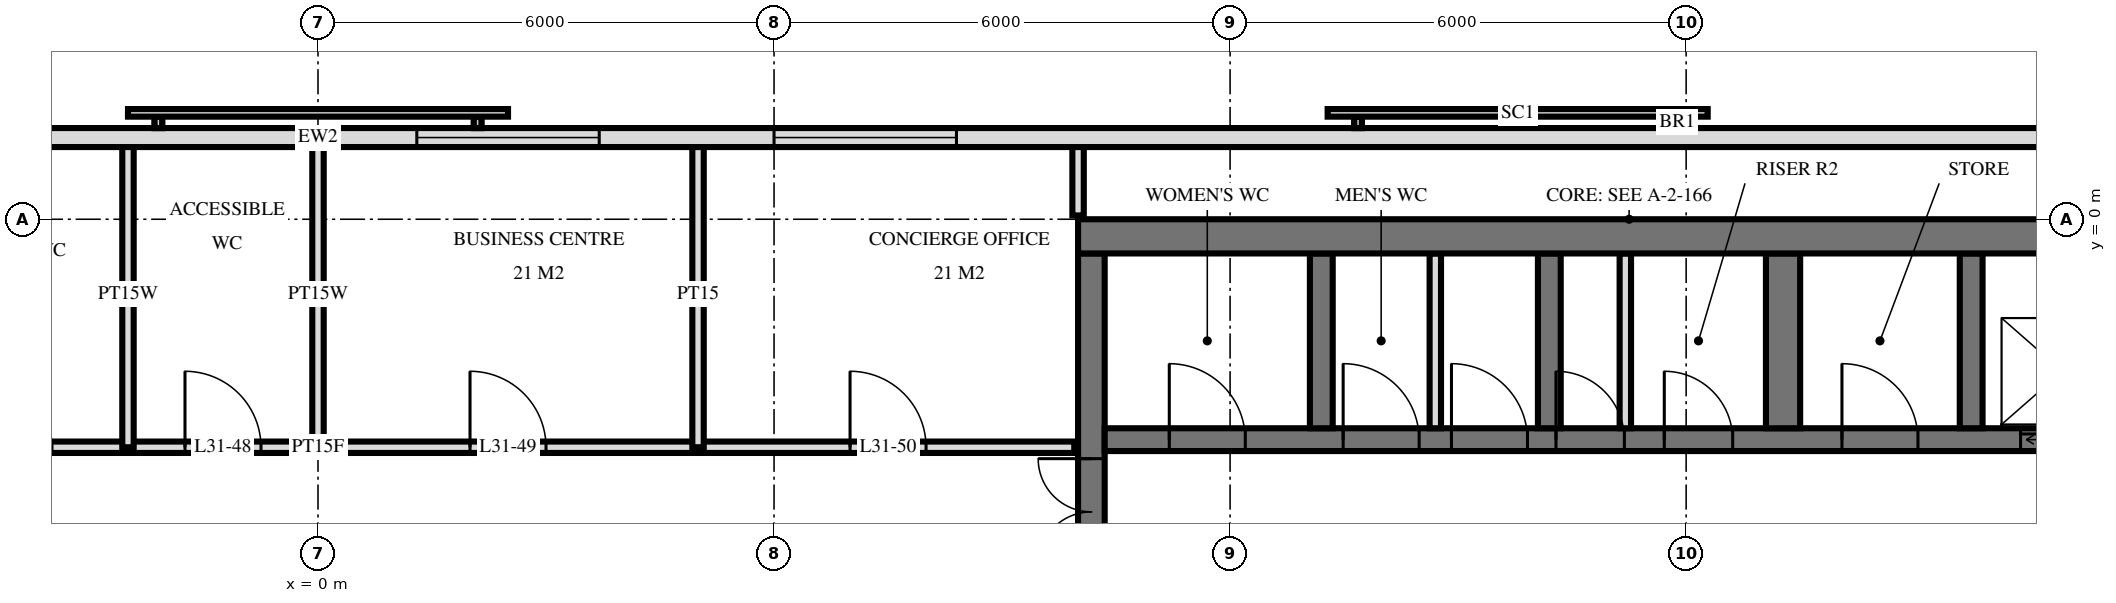
"""IFC4 building model, lengths in metres.
Left out: names, types, materials, properties, quantities, classifications, styles, units other than length and angle.
Written with IfcOpenShell. Run it as: python <this file> out.ifc"""

import sys

from ifc_helpers import new_model, si_unit, direction, frame, frame_2d, origin, place, context, subcontext, project, spatial, rectangle, extrude, element, fill, save


model = new_model("IFC4")
c1 = context("Model", 3, precision=1e-05, world=origin(), true_north=direction((0.0, 1.0)))
c2 = subcontext(c1, "Body", "Model", "MODEL_VIEW")
j1 = project(units=[si_unit("LENGTHUNIT", "METRE"), si_unit("PLANEANGLEUNIT", "RADIAN")], contexts=[c1])
p1 = place(None, origin())
s1 = spatial("IfcSite", under=j1, at=p1, CompositionType="ELEMENT")
p2 = place(p1, origin())
s2 = spatial("IfcBuilding", under=s1, at=p2, CompositionType="ELEMENT")
p3 = place(p2, frame((0.0, 0.0, 123.6)))
s3 = spatial("IfcBuildingStorey", under=s2, at=p3, CompositionType="ELEMENT", Elevation=123.6)
p4 = place(p3, frame((10.0, -0.225, 0.0), z_axis=(0.0, 0.0, 1.0), x_axis=(1.0, 0.0, 0.0)))
e1 = element("IfcWall", 1, at=p4, inside=s3, PredefinedType="SHEAR", context=c2, shape_type="SweptSolid", body=[
    extrude(rectangle(XDim=14.5, YDim=0.45, at=frame_2d((7.25, 0.0))), origin(), (0.0, 0.0, 1.0), 3.6),
])
p5 = place(p3, frame((10.175, -14.55, 0.0), z_axis=(0.0, 0.0, 1.0), x_axis=(0.0, 1.0, 0.0)))
e2 = element("IfcWall", 2, at=p5, inside=s3, PredefinedType="SHEAR", context=c2, shape_type="SweptSolid", body=[
    extrude(rectangle(XDim=14.1, YDim=0.35, at=frame_2d((7.05, 0.0))), origin(), (0.0, 0.0, 1.0), 3.6),
])
p6 = place(p5, frame((8.4, 0.0, 0.0)))
e3 = element("IfcOpeningElement", 3, at=p6, cuts=e2, PredefinedType="OPENING", context=c2, shape_type="SweptSolid", body=[
    extrude(rectangle(XDim=1.4, YDim=2.4, at=frame_2d((0.7, 1.2))), frame((0.0, 0.185, 0.0), z_axis=(0.0, -1.0, 0.0), x_axis=(1.0, 0.0, 0.0)), (0.0, 0.0, 1.0), 0.37),
])
p7 = place(p5, frame((10.0, 0.0, 0.0)))
e4 = element("IfcOpeningElement", 4, at=p7, cuts=e2, PredefinedType="OPENING", context=c2, shape_type="SweptSolid", body=[
    extrude(rectangle(XDim=1.4, YDim=2.4, at=frame_2d((0.7, 1.2))), frame((0.0, 0.185, 0.0), z_axis=(0.0, -1.0, 0.0), x_axis=(1.0, 0.0, 0.0)), (0.0, 0.0, 1.0), 0.37),
])
p8 = place(p5, frame((4.0, 0.0, 0.0)))
e5 = element("IfcOpeningElement", 5, at=p8, cuts=e2, PredefinedType="OPENING", context=c2, shape_type="SweptSolid", body=[
    extrude(rectangle(XDim=1.2, YDim=2.1, at=frame_2d((0.6, 1.05))), frame((0.0, 0.185, 0.0), z_axis=(0.0, -1.0, 0.0), x_axis=(1.0, 0.0, 0.0)), (0.0, 0.0, 1.0), 0.37),
])
p9 = place(p3, frame((10.35, -2.9, 0.0), z_axis=(0.0, 0.0, 1.0), x_axis=(1.0, 0.0, 0.0)))
e6 = element("IfcWall", 6, at=p9, inside=s3, PredefinedType="SHEAR", context=c2, shape_type="SweptSolid", body=[
    extrude(rectangle(XDim=13.7, YDim=0.3, at=frame_2d((6.85, 0.0))), origin(), (0.0, 0.0, 1.0), 3.6),
])
p10 = place(p9, frame((12.05, 0.0, 0.0)))
e7 = element("IfcOpeningElement", 7, at=p10, cuts=e6, PredefinedType="OPENING", context=c2, shape_type="SweptSolid", body=[
    extrude(rectangle(XDim=1.1, YDim=2.1, at=frame_2d((0.55, 1.05))), frame((0.0, 0.16, 0.0), z_axis=(0.0, -1.0, 0.0), x_axis=(1.0, 0.0, 0.0)), (0.0, 0.0, 1.0), 0.32),
])
p11 = place(p9, frame((5.938, 0.0, 0.0)))
e8 = element("IfcOpeningElement", 8, at=p11, cuts=e6, PredefinedType="OPENING", context=c2, shape_type="SweptSolid", body=[
    extrude(rectangle(XDim=0.9, YDim=2.1, at=frame_2d((0.45, 1.05))), frame((0.0, 0.16, 0.0), z_axis=(0.0, -1.0, 0.0), x_axis=(1.0, 0.0, 0.0)), (0.0, 0.0, 1.0), 0.32),
])
p12 = place(p9, frame((7.363, 0.0, 0.0)))
e9 = element("IfcOpeningElement", 9, at=p12, cuts=e6, PredefinedType="OPENING", context=c2, shape_type="SweptSolid", body=[
    extrude(rectangle(XDim=0.9, YDim=2.1, at=frame_2d((0.45, 1.05))), frame((0.0, 0.16, 0.0), z_axis=(0.0, -1.0, 0.0), x_axis=(1.0, 0.0, 0.0)), (0.0, 0.0, 1.0), 0.32),
])
p13 = place(p9, frame((0.85, 0.0, 0.0)))
e10 = element("IfcOpeningElement", 10, at=p13, cuts=e6, PredefinedType="OPENING", context=c2, shape_type="SweptSolid", body=[
    extrude(rectangle(XDim=1.0, YDim=2.1, at=frame_2d((0.5, 1.05))), frame((0.0, 0.16, 0.0), z_axis=(0.0, -1.0, 0.0), x_axis=(1.0, 0.0, 0.0)), (0.0, 0.0, 1.0), 0.32),
])
p14 = place(p9, frame((3.137, 0.0, 0.0)))
e11 = element("IfcOpeningElement", 11, at=p14, cuts=e6, PredefinedType="OPENING", context=c2, shape_type="SweptSolid", body=[
    extrude(rectangle(XDim=1.0, YDim=2.1, at=frame_2d((0.5, 1.05))), frame((0.0, 0.16, 0.0), z_axis=(0.0, -1.0, 0.0), x_axis=(1.0, 0.0, 0.0)), (0.0, 0.0, 1.0), 0.32),
])
p15 = place(p9, frame((4.562, 0.0, 0.0)))
e12 = element("IfcOpeningElement", 12, at=p15, cuts=e6, PredefinedType="OPENING", context=c2, shape_type="SweptSolid", body=[
    extrude(rectangle(XDim=1.0, YDim=2.1, at=frame_2d((0.5, 1.05))), frame((0.0, 0.16, 0.0), z_axis=(0.0, -1.0, 0.0), x_axis=(1.0, 0.0, 0.0)), (0.0, 0.0, 1.0), 0.32),
])
p16 = place(p9, frame((9.7, 0.0, 0.0)))
e13 = element("IfcOpeningElement", 13, at=p16, cuts=e6, PredefinedType="OPENING", context=c2, shape_type="SweptSolid", body=[
    extrude(rectangle(XDim=1.0, YDim=2.1, at=frame_2d((0.5, 1.05))), frame((0.0, 0.16, 0.0), z_axis=(0.0, -1.0, 0.0), x_axis=(1.0, 0.0, 0.0)), (0.0, 0.0, 1.0), 0.32),
])
for number, where, z_axis, x_axis in (
    (14, (13.2, -2.75, 0.0), (0.0, 0.0, 1.0), (0.0, 1.0, 0.0)),
    (15, (16.2, -2.75, 0.0), (0.0, 0.0, 1.0), (0.0, 1.0, 0.0)),
):
    element("IfcWall", number, at=place(p3, frame(where, z_axis=z_axis, x_axis=x_axis)), inside=s3, PredefinedType="SHEAR", context=c2, shape_type="SweptSolid", body=[
        extrude(rectangle(XDim=2.3, YDim=0.3, at=frame_2d((1.15, 0.0))), origin(), (0.0, 0.0, 1.0), 3.6),
    ])
p17 = place(p3, frame((19.275, -2.75, 0.0), z_axis=(0.0, 0.0, 1.0), x_axis=(0.0, 1.0, 0.0)))
e16 = element("IfcWall", 16, at=p17, inside=s3, PredefinedType="SHEAR", context=c2, shape_type="SweptSolid", body=[
    extrude(rectangle(XDim=2.3, YDim=0.45, at=frame_2d((1.15, 0.0))), origin(), (0.0, 0.0, 1.0), 3.6),
])
p18 = place(p3, frame((21.75, -2.75, 0.0), z_axis=(0.0, 0.0, 1.0), x_axis=(0.0, 1.0, 0.0)))
e17 = element("IfcWall", 17, at=p18, inside=s3, PredefinedType="SHEAR", context=c2, shape_type="SweptSolid", body=[
    extrude(rectangle(XDim=2.3, YDim=0.3, at=frame_2d((1.15, 0.0))), origin(), (0.0, 0.0, 1.0), 3.6),
])
p19 = place(p3, frame((23.675, 1.075, 0.0), z_axis=(0.0, 0.0, 1.0), x_axis=(-1.0, 0.0, 0.0)))
e18 = element("IfcWall", 18, at=p19, inside=s3, PredefinedType="SOLIDWALL", context=c2, shape_type="SweptSolid", body=[
    extrude(rectangle(XDim=47.351, YDim=0.25, at=frame_2d((23.675, 0.0))), origin(), (0.0, 0.0, 1.0), 3.32),
])
p20 = place(p19, frame((15.275, 0.0, 0.3)))
e19 = element("IfcOpeningElement", 19, at=p20, cuts=e18, PredefinedType="OPENING", context=c2, shape_type="SweptSolid", body=[
    extrude(rectangle(XDim=2.4, YDim=2.1, at=frame_2d((1.2, 1.05))), frame((0.0, 0.135, 0.0), z_axis=(0.0, -1.0, 0.0), x_axis=(1.0, 0.0, 0.0)), (0.0, 0.0, 1.0), 0.27),
])
p21 = place(p19, frame((19.975, 0.0, 0.3)))
e20 = element("IfcOpeningElement", 20, at=p21, cuts=e18, PredefinedType="OPENING", context=c2, shape_type="SweptSolid", body=[
    extrude(rectangle(XDim=2.4, YDim=2.1, at=frame_2d((1.2, 1.05))), frame((0.0, 0.135, 0.0), z_axis=(0.0, -1.0, 0.0), x_axis=(1.0, 0.0, 0.0)), (0.0, 0.0, 1.0), 0.27),
])
for number, where, z_axis, x_axis in (
    (21, (17.2, -2.75, 0.0), (0.0, 0.0, 1.0), (0.0, 1.0, 0.0)),
    (22, (14.7, -2.75, 0.0), (0.0, 0.0, 1.0), (0.0, 1.0, 0.0)),
):
    element("IfcWall", number, at=place(p3, frame(where, z_axis=z_axis, x_axis=x_axis)), inside=s3, PredefinedType="PARTITIONING", context=c2, shape_type="SweptSolid", body=[
        extrude(rectangle(XDim=2.3, YDim=0.15, at=frame_2d((1.15, 0.0))), origin(), (0.0, 0.0, 1.0), 3.3),
    ])
p22 = place(p3, frame((10.0, 0.05, 0.0), z_axis=(0.0, 0.0, 1.0), x_axis=(0.0, 1.0, 0.0)))
e23 = element("IfcWall", 23, at=p22, inside=s3, PredefinedType="PARTITIONING", context=c2, shape_type="SweptSolid", body=[
    extrude(rectangle(XDim=0.97, YDim=0.15, at=frame_2d((0.485, 0.0))), origin(), (0.0, 0.0, 1.0), 3.32),
])
p23 = place(p3, frame((5.0, -3.0, 0.0), z_axis=(0.0, 0.0, 1.0), x_axis=(0.0, 1.0, 0.0)))
e24 = element("IfcWall", 24, at=p23, inside=s3, PredefinedType="PARTITIONING", context=c2, shape_type="SweptSolid", body=[
    extrude(rectangle(XDim=4.02, YDim=0.15, at=frame_2d((2.01, 0.0))), origin(), (0.0, 0.0, 1.0), 3.32),
])
for number, where, z_axis, x_axis in (
    (25, (0.0, -3.0, 0.0), (0.0, 0.0, 1.0), (0.0, 1.0, 0.0)),
    (26, (-2.5, -3.0, 0.0), (0.0, 0.0, 1.0), (0.0, 1.0, 0.0)),
):
    element("IfcWall", number, at=place(p3, frame(where, z_axis=z_axis, x_axis=x_axis)), inside=s3, PredefinedType="PLUMBINGWALL", context=c2, shape_type="SweptSolid", body=[
        extrude(rectangle(XDim=4.02, YDim=0.15, at=frame_2d((2.01, 0.0))), origin(), (0.0, 0.0, 1.0), 3.32),
    ])
p24 = place(p3, frame((-9.95, -3.0, 0.0), z_axis=(0.0, 0.0, 1.0), x_axis=(1.0, 0.0, 0.0)))
e27 = element("IfcWall", 27, at=p24, inside=s3, PredefinedType="PARTITIONING", context=c2, shape_type="SweptSolid", body=[
    extrude(rectangle(XDim=19.9, YDim=0.15, at=frame_2d((9.95, 0.0))), origin(), (0.0, 0.0, 1.0), 3.32),
])
p25 = place(p24, frame((1.7, 0.0, 0.0)))
e28 = element("IfcOpeningElement", 28, at=p25, cuts=e27, PredefinedType="OPENING", context=c2, shape_type="SweptSolid", body=[
    extrude(rectangle(XDim=1.0, YDim=2.1, at=frame_2d((0.5, 1.05))), frame((0.0, 0.085, 0.0), z_axis=(0.0, -1.0, 0.0), x_axis=(1.0, 0.0, 0.0)), (0.0, 0.0, 1.0), 0.17),
])
p26 = place(p24, frame((5.45, 0.0, 0.0)))
e29 = element("IfcOpeningElement", 29, at=p26, cuts=e27, PredefinedType="OPENING", context=c2, shape_type="SweptSolid", body=[
    extrude(rectangle(XDim=1.0, YDim=2.1, at=frame_2d((0.5, 1.05))), frame((0.0, 0.085, 0.0), z_axis=(0.0, -1.0, 0.0), x_axis=(1.0, 0.0, 0.0)), (0.0, 0.0, 1.0), 0.17),
])
p27 = place(p24, frame((8.2, 0.0, 0.0)))
e30 = element("IfcOpeningElement", 30, at=p27, cuts=e27, PredefinedType="OPENING", context=c2, shape_type="SweptSolid", body=[
    extrude(rectangle(XDim=1.0, YDim=2.1, at=frame_2d((0.5, 1.05))), frame((0.0, 0.085, 0.0), z_axis=(0.0, -1.0, 0.0), x_axis=(1.0, 0.0, 0.0)), (0.0, 0.0, 1.0), 0.17),
])
p28 = place(p24, frame((11.95, 0.0, 0.0)))
e31 = element("IfcOpeningElement", 31, at=p28, cuts=e27, PredefinedType="OPENING", context=c2, shape_type="SweptSolid", body=[
    extrude(rectangle(XDim=1.0, YDim=2.1, at=frame_2d((0.5, 1.05))), frame((0.0, 0.085, 0.0), z_axis=(0.0, -1.0, 0.0), x_axis=(1.0, 0.0, 0.0)), (0.0, 0.0, 1.0), 0.17),
])
p29 = place(p24, frame((16.95, 0.0, 0.0)))
e32 = element("IfcOpeningElement", 32, at=p29, cuts=e27, PredefinedType="OPENING", context=c2, shape_type="SweptSolid", body=[
    extrude(rectangle(XDim=1.0, YDim=2.1, at=frame_2d((0.5, 1.05))), frame((0.0, 0.085, 0.0), z_axis=(0.0, -1.0, 0.0), x_axis=(1.0, 0.0, 0.0)), (0.0, 0.0, 1.0), 0.17),
])
p30 = place(p20, origin())
e33 = element("IfcWindow", 33, at=p30, inside=s3, PartitioningType="SINGLE_PANEL", PredefinedType="WINDOW", context=c2, shape_type="SweptSolid", body=[
    extrude(rectangle(XDim=2.4, YDim=2.1, at=frame_2d((1.2, 1.05))), frame((0.0, 0.03, 0.0), z_axis=(0.0, -1.0, 0.0), x_axis=(1.0, 0.0, 0.0)), (0.0, 0.0, 1.0), 0.06),
])
fill(e19, e33)
p31 = place(p21, origin())
e34 = element("IfcWindow", 34, at=p31, inside=s3, PartitioningType="SINGLE_PANEL", PredefinedType="WINDOW", context=c2, shape_type="SweptSolid", body=[
    extrude(rectangle(XDim=2.4, YDim=2.1, at=frame_2d((1.2, 1.05))), frame((0.0, 0.03, 0.0), z_axis=(0.0, -1.0, 0.0), x_axis=(1.0, 0.0, 0.0)), (0.0, 0.0, 1.0), 0.06),
])
fill(e20, e34)
p32 = place(p10, origin())
e35 = element("IfcDoor", 35, at=p32, inside=s3, OperationType="DOUBLE_DOOR_SLIDING", PredefinedType="USERDEFINED", context=c2, shape_type="SweptSolid", body=[
    extrude(rectangle(XDim=1.1, YDim=2.1, at=frame_2d((0.55, 1.05))), frame((0.0, 0.025, 0.0), z_axis=(0.0, -1.0, 0.0), x_axis=(1.0, 0.0, 0.0)), (0.0, 0.0, 1.0), 0.05),
])
fill(e7, e35)
p33 = place(p7, origin())
e36 = element("IfcDoor", 36, at=p33, inside=s3, OperationType="DOUBLE_DOOR_SINGLE_SWING", PredefinedType="DOOR", context=c2, shape_type="SweptSolid", body=[
    extrude(rectangle(XDim=1.4, YDim=2.4, at=frame_2d((0.7, 1.2))), frame((0.0, 0.025, 0.0), z_axis=(0.0, -1.0, 0.0), x_axis=(1.0, 0.0, 0.0)), (0.0, 0.0, 1.0), 0.05),
])
fill(e4, e36)
p34 = place(p11, origin())
e37 = element("IfcDoor", 37, at=p34, inside=s3, OperationType="SINGLE_SWING_RIGHT", PredefinedType="DOOR", context=c2, shape_type="SweptSolid", body=[
    extrude(rectangle(XDim=0.9, YDim=2.1, at=frame_2d((0.45, 1.05))), frame((0.0, 0.025, 0.0), z_axis=(0.0, -1.0, 0.0), x_axis=(1.0, 0.0, 0.0)), (0.0, 0.0, 1.0), 0.05),
])
fill(e8, e37)
p35 = place(p12, origin())
e38 = element("IfcDoor", 38, at=p35, inside=s3, OperationType="SINGLE_SWING_RIGHT", PredefinedType="DOOR", context=c2, shape_type="SweptSolid", body=[
    extrude(rectangle(XDim=0.9, YDim=2.1, at=frame_2d((0.45, 1.05))), frame((0.0, 0.025, 0.0), z_axis=(0.0, -1.0, 0.0), x_axis=(1.0, 0.0, 0.0)), (0.0, 0.0, 1.0), 0.05),
])
fill(e9, e38)
p36 = place(p13, origin())
e39 = element("IfcDoor", 39, at=p36, inside=s3, OperationType="SINGLE_SWING_RIGHT", PredefinedType="DOOR", context=c2, shape_type="SweptSolid", body=[
    extrude(rectangle(XDim=1.0, YDim=2.1, at=frame_2d((0.5, 1.05))), frame((0.0, 0.025, 0.0), z_axis=(0.0, -1.0, 0.0), x_axis=(1.0, 0.0, 0.0)), (0.0, 0.0, 1.0), 0.05),
])
fill(e10, e39)
p37 = place(p14, origin())
e40 = element("IfcDoor", 40, at=p37, inside=s3, OperationType="SINGLE_SWING_RIGHT", PredefinedType="DOOR", context=c2, shape_type="SweptSolid", body=[
    extrude(rectangle(XDim=1.0, YDim=2.1, at=frame_2d((0.5, 1.05))), frame((0.0, 0.025, 0.0), z_axis=(0.0, -1.0, 0.0), x_axis=(1.0, 0.0, 0.0)), (0.0, 0.0, 1.0), 0.05),
])
fill(e11, e40)
p38 = place(p15, origin())
e41 = element("IfcDoor", 41, at=p38, inside=s3, OperationType="SINGLE_SWING_RIGHT", PredefinedType="DOOR", context=c2, shape_type="SweptSolid", body=[
    extrude(rectangle(XDim=1.0, YDim=2.1, at=frame_2d((0.5, 1.05))), frame((0.0, 0.025, 0.0), z_axis=(0.0, -1.0, 0.0), x_axis=(1.0, 0.0, 0.0)), (0.0, 0.0, 1.0), 0.05),
])
fill(e12, e41)
p39 = place(p16, origin())
e42 = element("IfcDoor", 42, at=p39, inside=s3, OperationType="SINGLE_SWING_RIGHT", PredefinedType="DOOR", context=c2, shape_type="SweptSolid", body=[
    extrude(rectangle(XDim=1.0, YDim=2.1, at=frame_2d((0.5, 1.05))), frame((0.0, 0.025, 0.0), z_axis=(0.0, -1.0, 0.0), x_axis=(1.0, 0.0, 0.0)), (0.0, 0.0, 1.0), 0.05),
])
fill(e13, e42)
p40 = place(p27, origin())
e43 = element("IfcDoor", 43, at=p40, inside=s3, OperationType="SINGLE_SWING_RIGHT", PredefinedType="DOOR", context=c2, shape_type="SweptSolid", body=[
    extrude(rectangle(XDim=1.0, YDim=2.1, at=frame_2d((0.5, 1.05))), frame((0.0, 0.025, 0.0), z_axis=(0.0, -1.0, 0.0), x_axis=(1.0, 0.0, 0.0)), (0.0, 0.0, 1.0), 0.05),
])
fill(e30, e43)
p41 = place(p28, origin())
e44 = element("IfcDoor", 44, at=p41, inside=s3, OperationType="SINGLE_SWING_RIGHT", PredefinedType="DOOR", context=c2, shape_type="SweptSolid", body=[
    extrude(rectangle(XDim=1.0, YDim=2.1, at=frame_2d((0.5, 1.05))), frame((0.0, 0.025, 0.0), z_axis=(0.0, -1.0, 0.0), x_axis=(1.0, 0.0, 0.0)), (0.0, 0.0, 1.0), 0.05),
])
fill(e31, e44)
p42 = place(p29, origin())
e45 = element("IfcDoor", 45, at=p42, inside=s3, OperationType="SINGLE_SWING_RIGHT", PredefinedType="DOOR", context=c2, shape_type="SweptSolid", body=[
    extrude(rectangle(XDim=1.0, YDim=2.1, at=frame_2d((0.5, 1.05))), frame((0.0, 0.025, 0.0), z_axis=(0.0, -1.0, 0.0), x_axis=(1.0, 0.0, 0.0)), (0.0, 0.0, 1.0), 0.05),
])
fill(e32, e45)
save(model, sys.argv[1])
